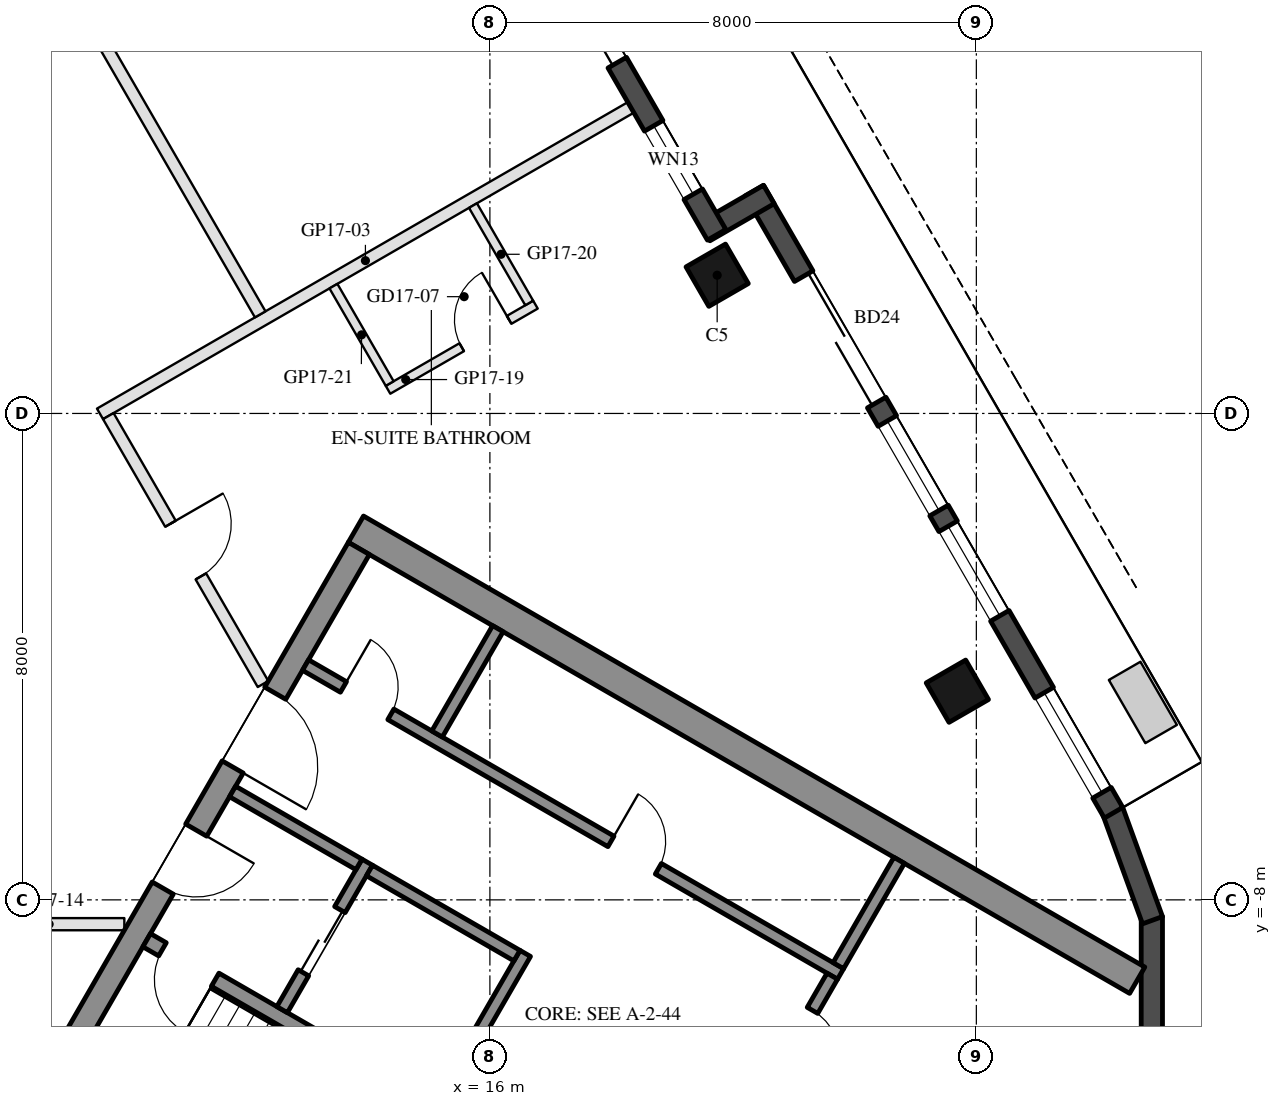
"""IFC4 building model, lengths in metres.
Left out: names, types, materials, properties, quantities, classifications, styles, units other than length and angle.
Written with IfcOpenShell. Run it as: python <this file> out.ifc"""

import sys

from ifc_helpers import new_model, si_unit, direction, frame, frame_2d, origin, origin_2d, place, context, subcontext, project, spatial, rectangle, hollow_rectangle, extrude, element, fill, save


model = new_model("IFC4")
c1 = context("Model", 3, precision=1e-05, world=origin(), true_north=direction((0.0, 1.0)))
c2 = subcontext(c1, "Body", "Model", "MODEL_VIEW")
j1 = project(units=[si_unit("LENGTHUNIT", "METRE"), si_unit("PLANEANGLEUNIT", "RADIAN")], contexts=[c1])
p1 = place(None, origin())
s1 = spatial("IfcSite", under=j1, at=p1, CompositionType="ELEMENT")
p2 = place(p1, origin())
s2 = spatial("IfcBuilding", under=s1, at=p2, CompositionType="ELEMENT")
p3 = place(p2, frame((0.0, 0.0, 187.3)))
s3 = spatial("IfcBuildingStorey", under=s2, at=p3, CompositionType="ELEMENT", Elevation=187.3)
for number, where, z_axis, x_axis in (
    (1, (23.688, -4.568, 0.0), (0.0, 0.0, 1.0), (-0.5, 0.866, 0.0)),
    (2, (19.738, 2.273, 0.0), (0.0, 0.0, 1.0), (-0.5, 0.866, 0.0)),
):
    element("IfcColumn", number, at=place(p3, frame(where, z_axis=z_axis, x_axis=x_axis)), inside=s3, PredefinedType="COLUMN", context=c2, shape_type="SweptSolid", body=[
        extrude(hollow_rectangle(XDim=0.75, YDim=0.75, WallThickness=0.035, at=origin_2d()), origin(), (0.0, 0.0, 1.0), 3.7),
    ])
for number, where, z_axis, x_axis in (
    (3, (26.244, -11.92, 0.0), (0.0, 0.0, 1.0), (0.342, 0.94, 0.0)),
    (4, (26.886, -10.185, 0.0), (0.0, 0.0, 1.0), (0.0, 1.0, 0.0)),
    (5, (26.897, -8.335, 0.0), (0.0, 0.0, 1.0), (-0.342, 0.94, 0.0)),
):
    element("IfcWall", number, at=place(p3, frame(where, z_axis=z_axis, x_axis=x_axis)), inside=s3, PredefinedType="SOLIDWALL", context=c2, shape_type="SweptSolid", body=[
        extrude(rectangle(XDim=1.91, YDim=0.35, at=frame_2d((0.955, 0.0))), origin(), (0.0, 0.0, 1.0), 3.55),
    ])
p4 = place(p3, frame((26.257, -6.567, 0.0), z_axis=(0.0, 0.0, 1.0), x_axis=(-0.500023526245, 0.866011820475, 0.0)))
e6 = element("IfcWall", 6, at=p4, inside=s3, PredefinedType="SOLIDWALL", context=c2, shape_type="SweptSolid", body=[
    extrude(rectangle(XDim=11.816, YDim=0.35, at=frame_2d((5.908, 0.0))), origin(), (0.0, 0.0, 1.0), 3.55),
])
p5 = place(p4, frame((0.38, 0.0, 0.3)))
e7 = element("IfcOpeningElement", 7, at=p5, cuts=e6, PredefinedType="OPENING", context=c2, shape_type="SweptSolid", body=[
    extrude(rectangle(XDim=1.9, YDim=2.65, at=frame_2d((0.95, 1.325))), frame((0.0, 0.185, 0.0), z_axis=(0.0, -1.0, 0.0), x_axis=(1.0, 0.0, 0.0)), (0.0, 0.0, 1.0), 0.37),
])
p6 = place(p4, frame((7.791, 0.0, 0.0)))
e8 = element("IfcOpeningElement", 8, at=p6, cuts=e6, PredefinedType="OPENING", context=c2, shape_type="SweptSolid", body=[
    extrude(rectangle(XDim=2.4, YDim=2.4, at=frame_2d((1.2, 1.2))), frame((0.0, 0.185, 0.0), z_axis=(0.0, -1.0, 0.0), x_axis=(1.0, 0.0, 0.0)), (0.0, 0.0, 1.0), 0.37),
])
p7 = place(p4, frame((3.741, 0.0, 0.3)))
e9 = element("IfcOpeningElement", 9, at=p7, cuts=e6, PredefinedType="OPENING", context=c2, shape_type="SweptSolid", body=[
    extrude(rectangle(XDim=1.7, YDim=2.65, at=frame_2d((0.85, 1.325))), frame((0.0, 0.185, 0.0), z_axis=(0.0, -1.0, 0.0), x_axis=(1.0, 0.0, 0.0)), (0.0, 0.0, 1.0), 0.37),
])
p8 = place(p4, frame((5.741, 0.0, 0.3)))
e10 = element("IfcOpeningElement", 10, at=p8, cuts=e6, PredefinedType="OPENING", context=c2, shape_type="SweptSolid", body=[
    extrude(rectangle(XDim=1.7, YDim=2.65, at=frame_2d((0.85, 1.325))), frame((0.0, 0.185, 0.0), z_axis=(0.0, -1.0, 0.0), x_axis=(1.0, 0.0, 0.0)), (0.0, 0.0, 1.0), 0.37),
])
p9 = place(p3, frame((20.588, 3.601, 0.0), z_axis=(0.0, 0.0, 1.0), x_axis=(-0.866005645448, -0.500034220881, 0.0)))
e11 = element("IfcWall", 11, at=p9, inside=s3, PredefinedType="SOLIDWALL", context=c2, shape_type="SweptSolid", body=[
    extrude(rectangle(XDim=1.22, YDim=0.35, at=frame_2d((0.61, 0.0))), origin(), (0.0, 0.0, 1.0), 3.55),
])
p10 = place(p3, frame((19.729, 2.938, 0.0), z_axis=(0.0, 0.0, 1.0), x_axis=(-0.499976430342, 0.866039011305, 0.0)))
e12 = element("IfcWall", 12, at=p10, inside=s3, PredefinedType="SOLIDWALL", context=c2, shape_type="SweptSolid", body=[
    extrude(rectangle(XDim=6.74, YDim=0.35, at=frame_2d((3.37, 0.0))), origin(), (0.0, 0.0, 1.0), 3.55),
])
p11 = place(p10, frame((0.77, 0.0, 0.3)))
e13 = element("IfcOpeningElement", 13, at=p11, cuts=e12, PredefinedType="OPENING", context=c2, shape_type="SweptSolid", body=[
    extrude(rectangle(XDim=1.3, YDim=2.65, at=frame_2d((0.65, 1.325))), frame((0.0, 0.185, 0.0), z_axis=(0.0, -1.0, 0.0), x_axis=(1.0, 0.0, 0.0)), (0.0, 0.0, 1.0), 0.37),
])
p12 = place(p10, frame((3.27, 0.0, 0.0)))
e14 = element("IfcOpeningElement", 14, at=p12, cuts=e12, PredefinedType="OPENING", context=c2, shape_type="SweptSolid", body=[
    extrude(rectangle(XDim=2.4, YDim=2.4, at=frame_2d((1.2, 1.2))), frame((0.0, 0.185, 0.0), z_axis=(0.0, -1.0, 0.0), x_axis=(1.0, 0.0, 0.0)), (0.0, 0.0, 1.0), 0.37),
])
p13 = place(p3, frame((13.797, -1.903, 0.0), z_axis=(0.0, 0.0, 1.0), x_axis=(0.866025009528, -0.500000682871, 0.0)))
e15 = element("IfcWall", 15, at=p13, inside=s3, PredefinedType="SHEAR", context=c2, shape_type="SweptSolid", body=[
    extrude(rectangle(XDim=14.837, YDim=0.5, at=frame_2d((7.418, 0.0))), origin(), (0.0, 0.0, 1.0), 3.5),
])
p14 = place(p3, frame((8.845, -10.88, 0.0), z_axis=(0.0, 0.0, 1.0), x_axis=(0.500004234368, 0.866022959057, 0.0)))
e16 = element("IfcWall", 16, at=p14, inside=s3, PredefinedType="SHEAR", context=c2, shape_type="SweptSolid", body=[
    extrude(rectangle(XDim=10.0, YDim=0.4, at=frame_2d((5.0, 0.0))), origin(), (0.0, 0.0, 1.0), 3.5),
])
p15 = place(p14, frame((3.55, 0.0, 0.0)))
e17 = element("IfcOpeningElement", 17, at=p15, cuts=e16, PredefinedType="OPENING", context=c2, shape_type="SweptSolid", body=[
    extrude(rectangle(XDim=1.1, YDim=2.1, at=frame_2d((0.55, 1.05))), frame((0.0, 0.21, 0.0), z_axis=(0.0, -1.0, 0.0), x_axis=(1.0, 0.0, 0.0)), (0.0, 0.0, 1.0), 0.42),
])
p16 = place(p14, frame((5.85, 0.0, 0.0)))
e18 = element("IfcOpeningElement", 18, at=p16, cuts=e16, PredefinedType="OPENING", context=c2, shape_type="SweptSolid", body=[
    extrude(rectangle(XDim=1.4, YDim=2.1, at=frame_2d((0.7, 1.05))), frame((0.0, 0.21, 0.0), z_axis=(0.0, -1.0, 0.0), x_axis=(1.0, 0.0, 0.0)), (0.0, 0.0, 1.0), 0.42),
])
p17 = place(p3, frame((10.356, -8.664, 0.0), z_axis=(0.0, 0.0, 1.0), x_axis=(0.866028629588, -0.499994412703, 0.0)))
e19 = element("IfcWall", 19, at=p17, inside=s3, PredefinedType="SHEAR", context=c2, shape_type="SweptSolid", body=[
    extrude(rectangle(XDim=6.45, YDim=0.25, at=frame_2d((3.225, 0.0))), origin(), (0.0, 0.0, 1.0), 3.5),
])
p18 = place(p17, frame((0.3, 0.0, 0.0)))
e20 = element("IfcOpeningElement", 20, at=p18, cuts=e19, PredefinedType="OPENING", context=c2, shape_type="SweptSolid", body=[
    extrude(rectangle(XDim=1.0, YDim=2.1, at=frame_2d((0.5, 1.05))), frame((0.0, 0.135, 0.0), z_axis=(0.0, -1.0, 0.0), x_axis=(1.0, 0.0, 0.0)), (0.0, 0.0, 1.0), 0.27),
])
p19 = place(p3, frame((15.181, -11.305, 0.0), z_axis=(0.0, 0.0, 1.0), x_axis=(0.49994636267, 0.866056369097, 0.0)))
e21 = element("IfcWall", 21, at=p19, inside=s3, PredefinedType="SHEAR", context=c2, shape_type="SweptSolid", body=[
    extrude(rectangle(XDim=2.8, YDim=0.2, at=frame_2d((1.4, 0.0))), origin(), (0.0, 0.0, 1.0), 3.5),
])
p20 = place(p3, frame((12.583, -9.805, 0.0), z_axis=(0.0, 0.0, 1.0), x_axis=(0.49994636267, 0.866056369097, 0.0)))
e22 = element("IfcWall", 22, at=p20, inside=s3, PredefinedType="SHEAR", context=c2, shape_type="SweptSolid", body=[
    extrude(rectangle(XDim=2.8, YDim=0.2, at=frame_2d((1.4, 0.0))), origin(), (0.0, 0.0, 1.0), 3.5),
])
p21 = place(p20, frame((0.7, 0.0, 0.0)))
e23 = element("IfcOpeningElement", 23, at=p21, cuts=e22, PredefinedType="OPENING", context=c2, shape_type="SweptSolid", body=[
    extrude(rectangle(XDim=1.2, YDim=2.1, at=frame_2d((0.6, 1.05))), frame((0.0, 0.11, 0.0), z_axis=(0.0, -1.0, 0.0), x_axis=(1.0, 0.0, 0.0)), (0.0, 0.0, 1.0), 0.22),
])
p22 = place(p3, frame((11.768, -6.217, 0.0), z_axis=(0.0, 0.0, 1.0), x_axis=(0.866050077142, -0.499957262057, 0.0)))
e24 = element("IfcWall", 24, at=p22, inside=s3, PredefinedType="SHEAR", context=c2, shape_type="SweptSolid", body=[
    extrude(rectangle(XDim=2.4, YDim=0.2, at=frame_2d((1.2, 0.0))), origin(), (0.0, 0.0, 1.0), 3.5),
])
p23 = place(p3, frame((14.02, -7.517, 0.0), z_axis=(0.0, 0.0, 1.0), x_axis=(0.866034573852, -0.49998411664, 0.0)))
e25 = element("IfcWall", 25, at=p23, inside=s3, PredefinedType="SHEAR", context=c2, shape_type="SweptSolid", body=[
    extrude(rectangle(XDim=2.8, YDim=0.2, at=frame_2d((1.4, 0.0))), origin(), (0.0, 0.0, 1.0), 3.5),
])
p24 = place(p3, frame((12.968, -4.138, 0.0), z_axis=(0.0, 0.0, 1.0), x_axis=(0.866028328073, -0.49999493495, 0.0)))
e26 = element("IfcWall", 26, at=p24, inside=s3, PredefinedType="SHEAR", context=c2, shape_type="SweptSolid", body=[
    extrude(rectangle(XDim=10.16, YDim=0.2, at=frame_2d((5.08, 0.0))), origin(), (0.0, 0.0, 1.0), 3.5),
])
p25 = place(p24, frame((0.72, 0.0, 0.0)))
e27 = element("IfcOpeningElement", 27, at=p25, cuts=e26, PredefinedType="OPENING", context=c2, shape_type="SweptSolid", body=[
    extrude(rectangle(XDim=0.9, YDim=2.1, at=frame_2d((0.45, 1.05))), frame((0.0, 0.11, 0.0), z_axis=(0.0, -1.0, 0.0), x_axis=(1.0, 0.0, 0.0)), (0.0, 0.0, 1.0), 0.22),
])
p26 = place(p24, frame((5.8, 0.0, 0.0)))
e28 = element("IfcOpeningElement", 28, at=p26, cuts=e26, PredefinedType="OPENING", context=c2, shape_type="SweptSolid", body=[
    extrude(rectangle(XDim=0.9, YDim=2.1, at=frame_2d((0.45, 1.05))), frame((0.0, 0.11, 0.0), z_axis=(0.0, -1.0, 0.0), x_axis=(1.0, 0.0, 0.0)), (0.0, 0.0, 1.0), 0.22),
])
p27 = place(p3, frame((20.43, -11.333, 0.0), z_axis=(0.0, 0.0, 1.0), x_axis=(0.500001309137, 0.866024647952, 0.0)))
e29 = element("IfcWall", 29, at=p27, inside=s3, PredefinedType="SHEAR", context=c2, shape_type="SweptSolid", body=[
    extrude(rectangle(XDim=2.4, YDim=0.2, at=frame_2d((1.2, 0.0))), origin(), (0.0, 0.0, 1.0), 3.5),
])
p28 = place(p27, frame((0.85, 0.0, 0.0)))
e30 = element("IfcOpeningElement", 30, at=p28, cuts=e29, PredefinedType="OPENING", context=c2, shape_type="SweptSolid", body=[
    extrude(rectangle(XDim=0.9, YDim=2.1, at=frame_2d((0.45, 1.05))), frame((0.0, 0.11, 0.0), z_axis=(0.0, -1.0, 0.0), x_axis=(1.0, 0.0, 0.0)), (0.0, 0.0, 1.0), 0.22),
])
for number, where, z_axis, x_axis in (
    (31, (15.131, -5.272, 0.0), (0.0, 0.0, 1.0), (0.5, 0.866, 0.0)),
    (32, (21.73, -9.082, 0.0), (0.0, 0.0, 1.0), (0.5, 0.866, 0.0)),
):
    element("IfcWall", number, at=place(p3, frame(where, z_axis=z_axis, x_axis=x_axis)), inside=s3, PredefinedType="SHEAR", context=c2, shape_type="SweptSolid", body=[
        extrude(rectangle(XDim=2.0, YDim=0.2, at=frame_2d((1.0, 0.0))), origin(), (0.0, 0.0, 1.0), 3.5),
    ])
p29 = place(p3, frame((18.318, 5.033, 0.0), z_axis=(0.0, 0.0, 1.0), x_axis=(-0.866028692387, -0.49999430393, 0.0)))
e33 = element("IfcWall", 33, at=p29, inside=s3, PredefinedType="PARTITIONING", context=c2, shape_type="SweptSolid", body=[
    extrude(rectangle(XDim=10.08, YDim=0.2, at=frame_2d((5.04, 0.0))), origin(), (0.0, 0.0, 1.0), 3.06),
])
p30 = place(p3, frame((9.988, -8.4, 0.0), z_axis=(0.0, 0.0, 1.0), x_axis=(-1.0, 0.0, 0.0)))
e34 = element("IfcWall", 34, at=p30, inside=s3, PredefinedType="PARTITIONING", context=c2, shape_type="SweptSolid", body=[
    extrude(rectangle(XDim=6.185, YDim=0.2, at=frame_2d((3.092, 0.0))), origin(), (0.0, 0.0, 1.0), 2.95),
])
p31 = place(p30, frame((2.592, 0.0, 0.0)))
e35 = element("IfcOpeningElement", 35, at=p31, cuts=e34, PredefinedType="OPENING", context=c2, shape_type="SweptSolid", body=[
    extrude(rectangle(XDim=1.0, YDim=2.1, at=frame_2d((0.5, 1.05))), frame((0.0, 0.11, 0.0), z_axis=(0.0, -1.0, 0.0), x_axis=(1.0, 0.0, 0.0)), (0.0, 0.0, 1.0), 0.22),
])
p32 = place(p3, frame((9.725, -0.043, 0.0), z_axis=(0.0, 0.0, 1.0), x_axis=(0.500014573982, -0.866016989329, 0.0)))
e36 = element("IfcWall", 36, at=p32, inside=s3, PredefinedType="PARTITIONING", context=c2, shape_type="SweptSolid", body=[
    extrude(rectangle(XDim=5.088, YDim=0.2, at=frame_2d((2.544, 0.0))), origin(), (0.0, 0.0, 1.0), 2.95),
])
p33 = place(p32, frame((2.044, 0.0, 0.0)))
e37 = element("IfcOpeningElement", 37, at=p33, cuts=e36, PredefinedType="OPENING", context=c2, shape_type="SweptSolid", body=[
    extrude(rectangle(XDim=1.0, YDim=2.1, at=frame_2d((0.5, 1.05))), frame((0.0, 0.11, 0.0), z_axis=(0.0, -1.0, 0.0), x_axis=(1.0, 0.0, 0.0)), (0.0, 0.0, 1.0), 0.22),
])
p34 = place(p3, frame((14.324, 0.389, 0.0), z_axis=(0.0, 0.0, 1.0), x_axis=(0.866034573852, 0.49998411664, 0.0)))
e38 = element("IfcWall", 38, at=p34, inside=s3, PredefinedType="PARTITIONING", context=c2, shape_type="SweptSolid", body=[
    extrude(rectangle(XDim=2.8, YDim=0.15, at=frame_2d((1.4, 0.0))), origin(), (0.0, 0.0, 1.0), 3.55),
])
p35 = place(p34, frame((1.4, 0.0, 0.0)))
e39 = element("IfcOpeningElement", 39, at=p35, cuts=e38, PredefinedType="OPENING", context=c2, shape_type="SweptSolid", body=[
    extrude(rectangle(XDim=0.9, YDim=2.1, at=frame_2d((0.45, 1.05))), frame((0.0, 0.085, 0.0), z_axis=(0.0, -1.0, 0.0), x_axis=(1.0, 0.0, 0.0)), (0.0, 0.0, 1.0), 0.17),
])
p36 = place(p3, frame((16.647, 1.817, 0.0), z_axis=(0.0, 0.0, 1.0), x_axis=(-0.500042316284, 0.866000971088, 0.0)))
e40 = element("IfcWall", 40, at=p36, inside=s3, PredefinedType="PARTITIONING", context=c2, shape_type="SweptSolid", body=[
    extrude(rectangle(XDim=1.85, YDim=0.15, at=frame_2d((0.925, 0.0))), origin(), (0.0, 0.0, 1.0), 3.55),
])
p37 = place(p3, frame((14.352, 0.492, 0.0), z_axis=(0.0, 0.0, 1.0), x_axis=(-0.499886193382, 0.866091100096, 0.0)))
e41 = element("IfcWall", 41, at=p37, inside=s3, PredefinedType="PARTITIONING", context=c2, shape_type="SweptSolid", body=[
    extrude(rectangle(XDim=1.85, YDim=0.15, at=frame_2d((0.925, 0.0))), origin(), (0.0, 0.0, 1.0), 3.55),
])
p38 = place(p3, frame((6.973, 10.723, 0.0), z_axis=(0.0, 0.0, 1.0), x_axis=(0.500000207062, -0.866025284237, 0.0)))
e42 = element("IfcWall", 42, at=p38, inside=s3, PredefinedType="PARTITIONING", context=c2, shape_type="SweptSolid", body=[
    extrude(rectangle(XDim=10.5, YDim=0.2, at=frame_2d((5.25, 0.0))), origin(), (0.0, 0.0, 1.0), 2.95),
])
p39 = place(p38, frame((2.45, 0.0, 0.0)))
e43 = element("IfcOpeningElement", 43, at=p39, cuts=e42, PredefinedType="OPENING", context=c2, shape_type="SweptSolid", body=[
    extrude(rectangle(XDim=1.0, YDim=2.1, at=frame_2d((0.5, 1.05))), frame((0.0, 0.11, 0.0), z_axis=(0.0, -1.0, 0.0), x_axis=(1.0, 0.0, 0.0)), (0.0, 0.0, 1.0), 0.22),
])
p40 = place(p5, origin())
e44 = element("IfcWindow", 44, at=p40, inside=s3, PartitioningType="SINGLE_PANEL", PredefinedType="WINDOW", context=c2, shape_type="SweptSolid", body=[
    extrude(rectangle(XDim=1.9, YDim=2.65, at=frame_2d((0.95, 1.325))), frame((0.0, 0.03, 0.0), z_axis=(0.0, -1.0, 0.0), x_axis=(1.0, 0.0, 0.0)), (0.0, 0.0, 1.0), 0.06),
])
fill(e7, e44)
p41 = place(p6, frame((2.4, 0.0, 0.0), z_axis=(0.0, 0.0, 1.0), x_axis=(-1.0, 0.0, 0.0)))
e45 = element("IfcDoor", 45, at=p41, inside=s3, OperationType="SLIDING_TO_LEFT", PredefinedType="DOOR", context=c2, shape_type="SweptSolid", body=[
    extrude(rectangle(XDim=2.4, YDim=2.4, at=frame_2d((1.2, 1.2))), frame((0.0, 0.025, 0.0), z_axis=(0.0, -1.0, 0.0), x_axis=(1.0, 0.0, 0.0)), (0.0, 0.0, 1.0), 0.05),
])
fill(e8, e45)
p42 = place(p7, origin())
e46 = element("IfcWindow", 46, at=p42, inside=s3, PartitioningType="SINGLE_PANEL", PredefinedType="WINDOW", context=c2, shape_type="SweptSolid", body=[
    extrude(rectangle(XDim=1.7, YDim=2.65, at=frame_2d((0.85, 1.325))), frame((0.0, 0.03, 0.0), z_axis=(0.0, -1.0, 0.0), x_axis=(1.0, 0.0, 0.0)), (0.0, 0.0, 1.0), 0.06),
])
fill(e9, e46)
p43 = place(p8, origin())
e47 = element("IfcWindow", 47, at=p43, inside=s3, PartitioningType="SINGLE_PANEL", PredefinedType="WINDOW", context=c2, shape_type="SweptSolid", body=[
    extrude(rectangle(XDim=1.7, YDim=2.65, at=frame_2d((0.85, 1.325))), frame((0.0, 0.03, 0.0), z_axis=(0.0, -1.0, 0.0), x_axis=(1.0, 0.0, 0.0)), (0.0, 0.0, 1.0), 0.06),
])
fill(e10, e47)
p44 = place(p11, origin())
e48 = element("IfcWindow", 48, at=p44, inside=s3, PartitioningType="SINGLE_PANEL", PredefinedType="WINDOW", context=c2, shape_type="SweptSolid", body=[
    extrude(rectangle(XDim=1.3, YDim=2.65, at=frame_2d((0.65, 1.325))), frame((0.0, 0.03, 0.0), z_axis=(0.0, -1.0, 0.0), x_axis=(1.0, 0.0, 0.0)), (0.0, 0.0, 1.0), 0.06),
])
fill(e13, e48)
p45 = place(p12, frame((2.4, 0.0, 0.0), z_axis=(0.0, 0.0, 1.0), x_axis=(-1.0, 0.0, 0.0)))
e49 = element("IfcDoor", 49, at=p45, inside=s3, OperationType="SLIDING_TO_LEFT", PredefinedType="DOOR", context=c2, shape_type="SweptSolid", body=[
    extrude(rectangle(XDim=2.4, YDim=2.4, at=frame_2d((1.2, 1.2))), frame((0.0, 0.025, 0.0), z_axis=(0.0, -1.0, 0.0), x_axis=(1.0, 0.0, 0.0)), (0.0, 0.0, 1.0), 0.05),
])
fill(e14, e49)
p46 = place(p21, origin())
e50 = element("IfcDoor", 50, at=p46, inside=s3, OperationType="DOUBLE_DOOR_SLIDING", PredefinedType="DOOR", context=c2, shape_type="SweptSolid", body=[
    extrude(rectangle(XDim=1.2, YDim=2.1, at=frame_2d((0.6, 1.05))), frame((0.0, 0.025, 0.0), z_axis=(0.0, -1.0, 0.0), x_axis=(1.0, 0.0, 0.0)), (0.0, 0.0, 1.0), 0.05),
])
fill(e23, e50)
p47 = place(p25, origin())
e51 = element("IfcDoor", 51, at=p47, inside=s3, OperationType="SINGLE_SWING_LEFT", PredefinedType="DOOR", context=c2, shape_type="SweptSolid", body=[
    extrude(rectangle(XDim=0.9, YDim=2.1, at=frame_2d((0.45, 1.05))), frame((0.0, 0.025, 0.0), z_axis=(0.0, -1.0, 0.0), x_axis=(1.0, 0.0, 0.0)), (0.0, 0.0, 1.0), 0.05),
])
fill(e27, e51)
p48 = place(p26, origin())
e52 = element("IfcDoor", 52, at=p48, inside=s3, OperationType="SINGLE_SWING_LEFT", PredefinedType="DOOR", context=c2, shape_type="SweptSolid", body=[
    extrude(rectangle(XDim=0.9, YDim=2.1, at=frame_2d((0.45, 1.05))), frame((0.0, 0.025, 0.0), z_axis=(0.0, -1.0, 0.0), x_axis=(1.0, 0.0, 0.0)), (0.0, 0.0, 1.0), 0.05),
])
fill(e28, e52)
p49 = place(p28, frame((0.9, 0.0, 0.0), z_axis=(0.0, 0.0, 1.0), x_axis=(-1.0, 0.0, 0.0)))
e53 = element("IfcDoor", 53, at=p49, inside=s3, OperationType="SINGLE_SWING_RIGHT", PredefinedType="DOOR", context=c2, shape_type="SweptSolid", body=[
    extrude(rectangle(XDim=0.9, YDim=2.1, at=frame_2d((0.45, 1.05))), frame((0.0, 0.025, 0.0), z_axis=(0.0, -1.0, 0.0), x_axis=(1.0, 0.0, 0.0)), (0.0, 0.0, 1.0), 0.05),
])
fill(e30, e53)
p50 = place(p15, frame((1.1, 0.0, 0.0), z_axis=(0.0, 0.0, 1.0), x_axis=(-1.0, 0.0, 0.0)))
e54 = element("IfcDoor", 54, at=p50, inside=s3, OperationType="SINGLE_SWING_LEFT", PredefinedType="DOOR", context=c2, shape_type="SweptSolid", body=[
    extrude(rectangle(XDim=1.1, YDim=2.1, at=frame_2d((0.55, 1.05))), frame((0.0, 0.025, 0.0), z_axis=(0.0, -1.0, 0.0), x_axis=(1.0, 0.0, 0.0)), (0.0, 0.0, 1.0), 0.05),
])
fill(e17, e54)
p51 = place(p16, frame((1.4, 0.0, 0.0), z_axis=(0.0, 0.0, 1.0), x_axis=(-1.0, 0.0, 0.0)))
e55 = element("IfcDoor", 55, at=p51, inside=s3, OperationType="DOUBLE_DOOR_SINGLE_SWING", PredefinedType="DOOR", context=c2, shape_type="SweptSolid", body=[
    extrude(rectangle(XDim=1.4, YDim=2.1, at=frame_2d((0.7, 1.05))), frame((0.0, 0.025, 0.0), z_axis=(0.0, -1.0, 0.0), x_axis=(1.0, 0.0, 0.0)), (0.0, 0.0, 1.0), 0.05),
])
fill(e18, e55)
p52 = place(p18, frame((1.0, 0.0, 0.0), z_axis=(0.0, 0.0, 1.0), x_axis=(-1.0, 0.0, 0.0)))
e56 = element("IfcDoor", 56, at=p52, inside=s3, OperationType="SINGLE_SWING_LEFT", PredefinedType="DOOR", context=c2, shape_type="SweptSolid", body=[
    extrude(rectangle(XDim=1.0, YDim=2.1, at=frame_2d((0.5, 1.05))), frame((0.0, 0.025, 0.0), z_axis=(0.0, -1.0, 0.0), x_axis=(1.0, 0.0, 0.0)), (0.0, 0.0, 1.0), 0.05),
])
fill(e20, e56)
p53 = place(p35, origin())
e57 = element("IfcDoor", 57, at=p53, inside=s3, OperationType="SINGLE_SWING_RIGHT", PredefinedType="DOOR", context=c2, shape_type="SweptSolid", body=[
    extrude(rectangle(XDim=0.9, YDim=2.1, at=frame_2d((0.45, 1.05))), frame((0.0, 0.025, 0.0), z_axis=(0.0, -1.0, 0.0), x_axis=(1.0, 0.0, 0.0)), (0.0, 0.0, 1.0), 0.05),
])
fill(e39, e57)
p54 = place(p33, origin())
e58 = element("IfcDoor", 58, at=p54, inside=s3, OperationType="SINGLE_SWING_LEFT", PredefinedType="DOOR", context=c2, shape_type="SweptSolid", body=[
    extrude(rectangle(XDim=1.0, YDim=2.1, at=frame_2d((0.5, 1.05))), frame((0.0, 0.025, 0.0), z_axis=(0.0, -1.0, 0.0), x_axis=(1.0, 0.0, 0.0)), (0.0, 0.0, 1.0), 0.05),
])
fill(e37, e58)
save(model, sys.argv[1])
